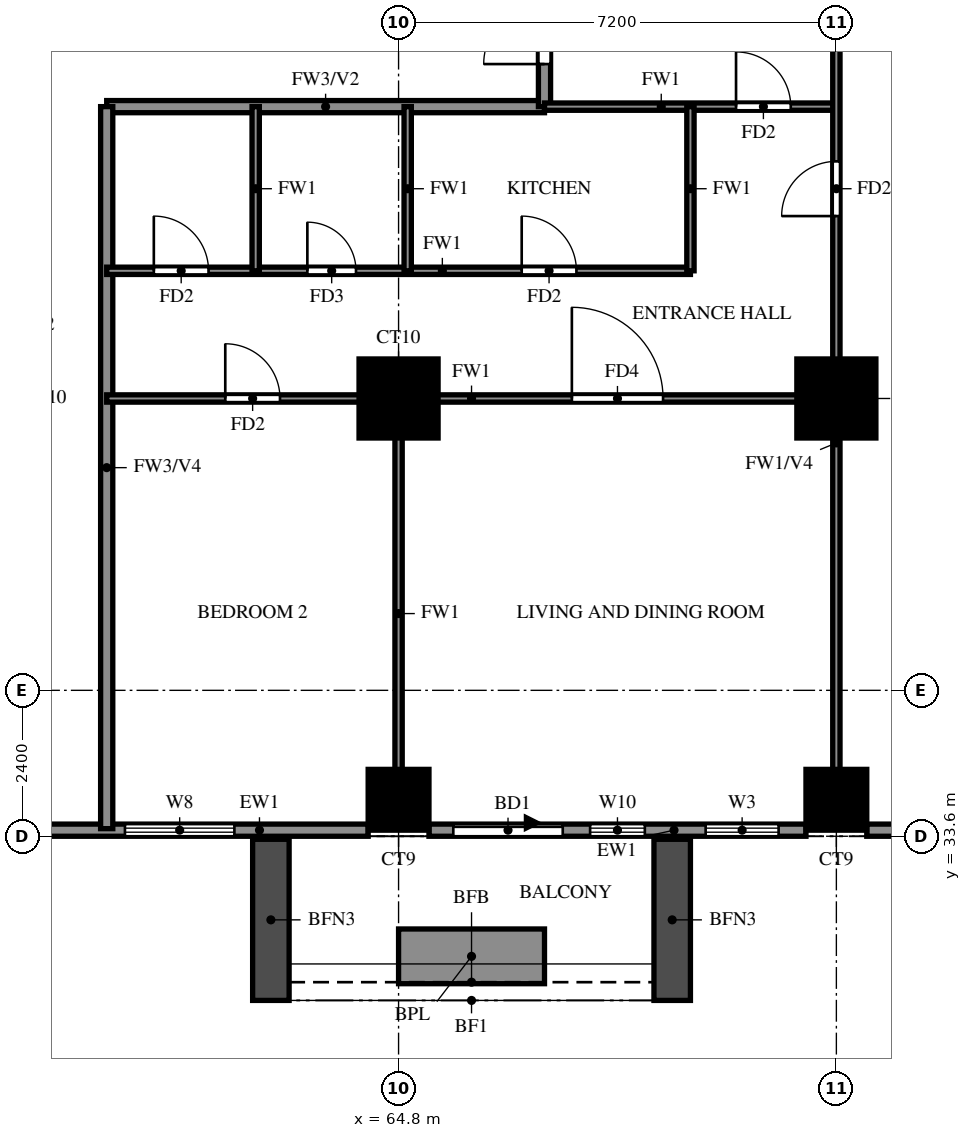
"""IFC4 building model, lengths in metres.
Left out: names, types, materials, properties, quantities, classifications, styles, units other than length and angle.
Written with IfcOpenShell. Run it as: python <this file> out.ifc"""

import sys

from ifc_helpers import new_model, si_unit, direction, frame, frame_2d, origin, origin_2d, place, context, subcontext, project, spatial, rectangle, extrude, source, transform, mapped, element, fill, save


model = new_model("IFC4")
c1 = context("Model", 3, precision=1e-05, world=origin(), true_north=direction((0.0, 1.0)))
c2 = subcontext(c1, "Body", "Model", "MODEL_VIEW")
j1 = project(units=[si_unit("LENGTHUNIT", "METRE"), si_unit("PLANEANGLEUNIT", "RADIAN")], contexts=[c1])
p1 = place(None, origin())
s1 = spatial("IfcSite", under=j1, at=p1, CompositionType="ELEMENT")
p2 = place(p1, origin())
s2 = spatial("IfcBuilding", under=s1, at=p2, CompositionType="ELEMENT")
p3 = place(p2, frame((0.0, 0.0, 62.0)))
s3 = spatial("IfcBuildingStorey", under=s2, at=p3, CompositionType="ELEMENT", Elevation=62.0)
m1 = source(origin(), c2, "Body", "SweptSolid", [
    extrude(rectangle(XDim=1.0, YDim=1.0, at=origin_2d()), origin(), (0.0, 0.0, 1.0), 3.18),
])
for number, where, z_axis, x_axis in (
    (1, (64.8, 34.2, 0.0), (0.0, 0.0, 1.0), (1.0, 0.0, 0.0)),
    (2, (72.0, 34.2, 0.0), (0.0, 0.0, 1.0), (1.0, 0.0, 0.0)),
):
    element("IfcColumn", number, at=place(p3, frame(where, z_axis=z_axis, x_axis=x_axis)), inside=s3, PredefinedType="COLUMN", context=c2, shape_type="MappedRepresentation", body=[
        mapped(m1, transform((0.0, 0.0, 0.0))),
    ])
m2 = source(origin(), c2, "Body", "SweptSolid", [
    extrude(rectangle(XDim=1.3, YDim=1.3, at=origin_2d()), origin(), (0.0, 0.0, 1.0), 3.18),
])
for number, where, z_axis, x_axis in (
    (3, (64.8, 40.8, 0.0), (0.0, 0.0, 1.0), (1.0, 0.0, 0.0)),
    (4, (72.0, 40.8, 0.0), (0.0, 0.0, 1.0), (1.0, 0.0, 0.0)),
):
    element("IfcColumn", number, at=place(p3, frame(where, z_axis=z_axis, x_axis=x_axis)), inside=s3, PredefinedType="COLUMN", context=c2, shape_type="MappedRepresentation", body=[
        mapped(m2, transform((0.0, 0.0, 0.0))),
    ])
p4 = place(p3, frame((85.996, 33.863, 0.0), z_axis=(0.0, 0.0, 1.0), x_axis=(-0.707100718496, 0.707112843825, 0.0)))
e5 = element("IfcWall", 5, at=p4, inside=s3, PredefinedType="SOLIDWALL", context=c2, shape_type="SweptSolid", body=[
    extrude(rectangle(XDim=20.135, YDim=0.2, at=frame_2d((10.067, 0.0))), origin(), (0.0, 0.0, 1.0), 3.18),
])
p5 = place(p3, frame((58.8, 33.7, 0.0), z_axis=(0.0, 0.0, 1.0), x_axis=(1.0, 0.0, 0.0)))
e6 = element("IfcWall", 6, at=p5, inside=s3, PredefinedType="SOLIDWALL", context=c2, shape_type="SweptSolid", body=[
    extrude(rectangle(XDim=5.5, YDim=0.2, at=frame_2d((2.75, 0.0))), origin(), (0.0, 0.0, 1.0), 3.18),
])
p6 = place(p5, frame((1.5, 0.0, 0.6)))
e7 = element("IfcOpeningElement", 7, at=p6, cuts=e6, PredefinedType="OPENING", context=c2, shape_type="SweptSolid", body=[
    extrude(rectangle(XDim=1.8, YDim=2.4, at=frame_2d((0.9, 1.2))), frame((0.0, 0.11, 0.0), z_axis=(0.0, -1.0, 0.0), x_axis=(1.0, 0.0, 0.0)), (0.0, 0.0, 1.0), 0.22),
])
p7 = place(p3, frame((65.3, 33.7, 0.0), z_axis=(0.0, 0.0, 1.0), x_axis=(1.0, 0.0, 0.0)))
e8 = element("IfcWall", 8, at=p7, inside=s3, PredefinedType="SOLIDWALL", context=c2, shape_type="SweptSolid", body=[
    extrude(rectangle(XDim=6.2, YDim=0.2, at=frame_2d((3.1, 0.0))), origin(), (0.0, 0.0, 1.0), 3.18),
])
p8 = place(p7, frame((0.4, 0.0, 0.0)))
e9 = element("IfcOpeningElement", 9, at=p8, cuts=e8, PredefinedType="OPENING", context=c2, shape_type="SweptSolid", body=[
    extrude(rectangle(XDim=1.8, YDim=2.4, at=frame_2d((0.9, 1.2))), frame((0.0, 0.11, 0.0), z_axis=(0.0, -1.0, 0.0), x_axis=(1.0, 0.0, 0.0)), (0.0, 0.0, 1.0), 0.22),
])
p9 = place(p7, frame((2.65, 0.0, 0.6)))
e10 = element("IfcOpeningElement", 10, at=p9, cuts=e8, PredefinedType="OPENING", context=c2, shape_type="SweptSolid", body=[
    extrude(rectangle(XDim=0.9, YDim=2.4, at=frame_2d((0.45, 1.2))), frame((0.0, 0.11, 0.0), z_axis=(0.0, -1.0, 0.0), x_axis=(1.0, 0.0, 0.0)), (0.0, 0.0, 1.0), 0.22),
])
p10 = place(p7, frame((4.55, 0.0, 0.6)))
e11 = element("IfcOpeningElement", 11, at=p10, cuts=e8, PredefinedType="OPENING", context=c2, shape_type="SweptSolid", body=[
    extrude(rectangle(XDim=1.2, YDim=2.4, at=frame_2d((0.6, 1.2))), frame((0.0, 0.11, 0.0), z_axis=(0.0, -1.0, 0.0), x_axis=(1.0, 0.0, 0.0)), (0.0, 0.0, 1.0), 0.22),
])
p11 = place(p3, frame((72.5, 33.7, 0.0), z_axis=(0.0, 0.0, 1.0), x_axis=(1.0, 0.0, 0.0)))
e12 = element("IfcWall", 12, at=p11, inside=s3, PredefinedType="SOLIDWALL", context=c2, shape_type="SweptSolid", body=[
    extrude(rectangle(XDim=10.9, YDim=0.2, at=frame_2d((5.45, 0.0))), origin(), (0.0, 0.0, 1.0), 3.18),
])
p12 = place(p11, frame((7.0, 0.0, 0.0)))
e13 = element("IfcOpeningElement", 13, at=p12, cuts=e12, PredefinedType="OPENING", context=c2, shape_type="SweptSolid", body=[
    extrude(rectangle(XDim=1.8, YDim=2.4, at=frame_2d((0.9, 1.2))), frame((0.0, 0.11, 0.0), z_axis=(0.0, -1.0, 0.0), x_axis=(1.0, 0.0, 0.0)), (0.0, 0.0, 1.0), 0.22),
])
p13 = place(p11, frame((1.05, 0.0, 0.6)))
e14 = element("IfcOpeningElement", 14, at=p13, cuts=e12, PredefinedType="OPENING", context=c2, shape_type="SweptSolid", body=[
    extrude(rectangle(XDim=2.4, YDim=2.4, at=frame_2d((1.2, 1.2))), frame((0.0, 0.11, 0.0), z_axis=(0.0, -1.0, 0.0), x_axis=(1.0, 0.0, 0.0)), (0.0, 0.0, 1.0), 0.22),
])
p14 = place(p11, frame((5.2, 0.0, 0.6)))
e15 = element("IfcOpeningElement", 15, at=p14, cuts=e12, PredefinedType="OPENING", context=c2, shape_type="SweptSolid", body=[
    extrude(rectangle(XDim=1.2, YDim=2.4, at=frame_2d((0.6, 1.2))), frame((0.0, 0.11, 0.0), z_axis=(0.0, -1.0, 0.0), x_axis=(1.0, 0.0, 0.0)), (0.0, 0.0, 1.0), 0.22),
])
p15 = place(p11, frame((9.3, 0.0, 0.6)))
e16 = element("IfcOpeningElement", 16, at=p15, cuts=e12, PredefinedType="OPENING", context=c2, shape_type="SweptSolid", body=[
    extrude(rectangle(XDim=1.2, YDim=2.4, at=frame_2d((0.6, 1.2))), frame((0.0, 0.11, 0.0), z_axis=(0.0, -1.0, 0.0), x_axis=(1.0, 0.0, 0.0)), (0.0, 0.0, 1.0), 0.22),
])
for number, where, z_axis, x_axis in (
    (17, (62.7, 33.55, 0.0), (0.0, 0.0, 1.0), (0.0, -1.0, 0.0)),
    (18, (69.3, 33.55, 0.0), (0.0, 0.0, 1.0), (0.0, -1.0, 0.0)),
):
    element("IfcWall", number, at=place(p3, frame(where, z_axis=z_axis, x_axis=x_axis)), inside=s3, PredefinedType="SOLIDWALL", context=c2, shape_type="SweptSolid", body=[
        extrude(rectangle(XDim=2.65, YDim=0.6, at=frame_2d((1.325, 0.0))), origin(), (0.0, 0.0, 1.0), 2.85),
    ])
p16 = place(p3, frame((64.8, 31.625, 0.0), z_axis=(0.0, 0.0, 1.0), x_axis=(1.0, 0.0, 0.0)))
e19 = element("IfcWall", 19, at=p16, inside=s3, PredefinedType="SOLIDWALL", context=c2, shape_type="SweptSolid", body=[
    extrude(rectangle(XDim=2.4, YDim=0.9, at=frame_2d((1.2, 0.0))), origin(), (0.0, 0.0, 1.0), 0.9),
])
p17 = place(p3, frame((60.0, 45.6, 0.0), z_axis=(0.0, 0.0, 1.0), x_axis=(1.0, 0.0, 0.0)))
e20 = element("IfcWall", 20, at=p17, inside=s3, PredefinedType="SOLIDWALL", context=c2, shape_type="SweptSolid", body=[
    extrude(rectangle(XDim=7.2, YDim=0.2, at=frame_2d((3.6, 0.0))), origin(), (0.0, 0.0, 1.0), 3.18),
])
p18 = place(p3, frame((60.0, 33.725, 0.0), z_axis=(0.0, 0.0, 1.0), x_axis=(0.0, 1.0, 0.0)))
e21 = element("IfcWall", 21, at=p18, inside=s3, PredefinedType="SOLIDWALL", context=c2, shape_type="SweptSolid", body=[
    extrude(rectangle(XDim=11.875, YDim=0.2, at=frame_2d((5.938, 0.0))), origin(), (0.0, 0.0, 1.0), 2.28),
])
p19 = place(p3, frame((67.2, 45.6, 0.0), z_axis=(0.0, 0.0, 1.0), x_axis=(0.0, 1.0, 0.0)))
e22 = element("IfcWall", 22, at=p19, inside=s3, PredefinedType="SOLIDWALL", context=c2, shape_type="SweptSolid", body=[
    extrude(rectangle(XDim=12.0, YDim=0.2, at=frame_2d((6.0, 0.0))), origin(), (0.0, 0.0, 1.0), 3.18),
])
p20 = place(p19, frame((10.3, 0.0, 0.0)))
e23 = element("IfcOpeningElement", 23, at=p20, cuts=e22, PredefinedType="OPENING", context=c2, shape_type="SweptSolid", body=[
    extrude(rectangle(XDim=1.0, YDim=2.1, at=frame_2d((0.5, 1.05))), frame((0.0, 0.11, 0.0), z_axis=(0.0, -1.0, 0.0), x_axis=(1.0, 0.0, 0.0)), (0.0, 0.0, 1.0), 0.22),
])
p21 = place(p19, frame((0.7, 0.0, 0.0)))
e24 = element("IfcOpeningElement", 24, at=p21, cuts=e22, PredefinedType="OPENING", context=c2, shape_type="SweptSolid", body=[
    extrude(rectangle(XDim=1.0, YDim=2.1, at=frame_2d((0.5, 1.05))), frame((0.0, 0.11, 0.0), z_axis=(0.0, -1.0, 0.0), x_axis=(1.0, 0.0, 0.0)), (0.0, 0.0, 1.0), 0.22),
])
p22 = place(p3, frame((60.0, 40.8, 0.0), z_axis=(0.0, 0.0, 1.0), x_axis=(1.0, 0.0, 0.0)))
e25 = element("IfcWall", 25, at=p22, inside=s3, PredefinedType="PARTITIONING", context=c2, shape_type="SweptSolid", body=[
    extrude(rectangle(XDim=12.0, YDim=0.12, at=frame_2d((6.0, 0.0))), origin(), (0.0, 0.0, 1.0), 3.18),
])
p23 = place(p22, frame((7.65, 0.0, 0.0)))
e26 = element("IfcOpeningElement", 26, at=p23, cuts=e25, PredefinedType="OPENING", context=c2, shape_type="SweptSolid", body=[
    extrude(rectangle(XDim=1.5, YDim=2.1, at=frame_2d((0.75, 1.05))), frame((0.0, 0.07, 0.0), z_axis=(0.0, -1.0, 0.0), x_axis=(1.0, 0.0, 0.0)), (0.0, 0.0, 1.0), 0.14),
])
p24 = place(p22, frame((1.95, 0.0, 0.0)))
e27 = element("IfcOpeningElement", 27, at=p24, cuts=e25, PredefinedType="OPENING", context=c2, shape_type="SweptSolid", body=[
    extrude(rectangle(XDim=0.9, YDim=2.1, at=frame_2d((0.45, 1.05))), frame((0.0, 0.07, 0.0), z_axis=(0.0, -1.0, 0.0), x_axis=(1.0, 0.0, 0.0)), (0.0, 0.0, 1.0), 0.14),
])
p25 = place(p3, frame((60.0, 42.9, 0.0), z_axis=(0.0, 0.0, 1.0), x_axis=(1.0, 0.0, 0.0)))
e28 = element("IfcWall", 28, at=p25, inside=s3, PredefinedType="PARTITIONING", context=c2, shape_type="SweptSolid", body=[
    extrude(rectangle(XDim=9.6, YDim=0.12, at=frame_2d((4.8, 0.0))), origin(), (0.0, 0.0, 1.0), 3.18),
])
p26 = place(p25, frame((6.825, 0.0, 0.0)))
e29 = element("IfcOpeningElement", 29, at=p26, cuts=e28, PredefinedType="OPENING", context=c2, shape_type="SweptSolid", body=[
    extrude(rectangle(XDim=0.9, YDim=2.1, at=frame_2d((0.45, 1.05))), frame((0.0, 0.07, 0.0), z_axis=(0.0, -1.0, 0.0), x_axis=(1.0, 0.0, 0.0)), (0.0, 0.0, 1.0), 0.14),
])
p27 = place(p25, frame((3.3, 0.0, 0.0)))
e30 = element("IfcOpeningElement", 30, at=p27, cuts=e28, PredefinedType="OPENING", context=c2, shape_type="SweptSolid", body=[
    extrude(rectangle(XDim=0.8, YDim=2.1, at=frame_2d((0.4, 1.05))), frame((0.0, 0.07, 0.0), z_axis=(0.0, -1.0, 0.0), x_axis=(1.0, 0.0, 0.0)), (0.0, 0.0, 1.0), 0.14),
])
p28 = place(p25, frame((0.775, 0.0, 0.0)))
e31 = element("IfcOpeningElement", 31, at=p28, cuts=e28, PredefinedType="OPENING", context=c2, shape_type="SweptSolid", body=[
    extrude(rectangle(XDim=0.9, YDim=2.1, at=frame_2d((0.45, 1.05))), frame((0.0, 0.07, 0.0), z_axis=(0.0, -1.0, 0.0), x_axis=(1.0, 0.0, 0.0)), (0.0, 0.0, 1.0), 0.14),
])
p29 = place(p3, frame((67.2, 45.6, 0.0), z_axis=(0.0, 0.0, 1.0), x_axis=(1.0, 0.0, 0.0)))
e32 = element("IfcWall", 32, at=p29, inside=s3, PredefinedType="PARTITIONING", context=c2, shape_type="SweptSolid", body=[
    extrude(rectangle(XDim=4.8, YDim=0.12, at=frame_2d((2.4, 0.0))), origin(), (0.0, 0.0, 1.0), 3.18),
])
p30 = place(p29, frame((3.15, 0.0, 0.0)))
e33 = element("IfcOpeningElement", 33, at=p30, cuts=e32, PredefinedType="OPENING", context=c2, shape_type="SweptSolid", body=[
    extrude(rectangle(XDim=0.9, YDim=2.1, at=frame_2d((0.45, 1.05))), frame((0.0, 0.07, 0.0), z_axis=(0.0, -1.0, 0.0), x_axis=(1.0, 0.0, 0.0)), (0.0, 0.0, 1.0), 0.14),
])
p31 = place(p3, frame((62.45, 42.9, 0.0), z_axis=(0.0, 0.0, 1.0), x_axis=(0.0, 1.0, 0.0)))
e34 = element("IfcWall", 34, at=p31, inside=s3, PredefinedType="PARTITIONING", context=c2, shape_type="SweptSolid", body=[
    extrude(rectangle(XDim=2.7, YDim=0.12, at=frame_2d((1.35, 0.0))), origin(), (0.0, 0.0, 1.0), 3.18),
])
p32 = place(p3, frame((64.8, 33.725, 0.0), z_axis=(0.0, 0.0, 1.0), x_axis=(0.0, 1.0, 0.0)))
e35 = element("IfcWall", 35, at=p32, inside=s3, PredefinedType="PARTITIONING", context=c2, shape_type="SweptSolid", body=[
    extrude(rectangle(XDim=7.075, YDim=0.12, at=frame_2d((3.538, 0.0))), origin(), (0.0, 0.0, 1.0), 3.18),
])
for number, where, z_axis, x_axis in (
    (36, (64.95, 42.9, 0.0), (0.0, 0.0, 1.0), (0.0, 1.0, 0.0)),
    (37, (69.6, 42.9, 0.0), (0.0, 0.0, 1.0), (0.0, 1.0, 0.0)),
):
    element("IfcWall", number, at=place(p3, frame(where, z_axis=z_axis, x_axis=x_axis)), inside=s3, PredefinedType="PARTITIONING", context=c2, shape_type="SweptSolid", body=[
        extrude(rectangle(XDim=2.7, YDim=0.12, at=frame_2d((1.35, 0.0))), origin(), (0.0, 0.0, 1.0), 3.18),
    ])
p33 = place(p3, frame((72.0, 33.725, 0.0), z_axis=(0.0, 0.0, 1.0), x_axis=(0.0, 1.0, 0.0)))
e38 = element("IfcWall", 38, at=p33, inside=s3, PredefinedType="PARTITIONING", context=c2, shape_type="SweptSolid", body=[
    extrude(rectangle(XDim=14.098, YDim=0.12, at=frame_2d((7.049, 0.0))), origin(), (0.0, 0.0, 1.0), 2.28),
])
p34 = place(p33, frame((10.075, 0.0, 0.0)))
e39 = element("IfcOpeningElement", 39, at=p34, cuts=e38, PredefinedType="OPENING", context=c2, shape_type="SweptSolid", body=[
    extrude(rectangle(XDim=0.9, YDim=2.1, at=frame_2d((0.45, 1.05))), frame((0.0, 0.07, 0.0), z_axis=(0.0, -1.0, 0.0), x_axis=(1.0, 0.0, 0.0)), (0.0, 0.0, 1.0), 0.14),
])
p35 = place(p6, origin())
e40 = element("IfcWindow", 40, at=p35, inside=s3, PartitioningType="DOUBLE_PANEL_VERTICAL", PredefinedType="WINDOW", context=c2, shape_type="SweptSolid", body=[
    extrude(rectangle(XDim=1.8, YDim=2.4, at=frame_2d((0.9, 1.2))), frame((0.0, 0.03, 0.0), z_axis=(0.0, -1.0, 0.0), x_axis=(1.0, 0.0, 0.0)), (0.0, 0.0, 1.0), 0.06),
])
fill(e7, e40)
p36 = place(p8, origin())
e41 = element("IfcDoor", 41, at=p36, inside=s3, OperationType="DOUBLE_DOOR_SLIDING", PredefinedType="DOOR", context=c2, shape_type="SweptSolid", body=[
    extrude(rectangle(XDim=1.8, YDim=2.4, at=frame_2d((0.9, 1.2))), frame((0.0, 0.025, 0.0), z_axis=(0.0, -1.0, 0.0), x_axis=(1.0, 0.0, 0.0)), (0.0, 0.0, 1.0), 0.05),
])
fill(e9, e41)
p37 = place(p9, origin())
e42 = element("IfcWindow", 42, at=p37, inside=s3, PartitioningType="SINGLE_PANEL", PredefinedType="WINDOW", context=c2, shape_type="SweptSolid", body=[
    extrude(rectangle(XDim=0.9, YDim=2.4, at=frame_2d((0.45, 1.2))), frame((0.0, 0.03, 0.0), z_axis=(0.0, -1.0, 0.0), x_axis=(1.0, 0.0, 0.0)), (0.0, 0.0, 1.0), 0.06),
])
fill(e10, e42)
p38 = place(p10, origin())
e43 = element("IfcWindow", 43, at=p38, inside=s3, PartitioningType="SINGLE_PANEL", PredefinedType="WINDOW", context=c2, shape_type="SweptSolid", body=[
    extrude(rectangle(XDim=1.2, YDim=2.4, at=frame_2d((0.6, 1.2))), frame((0.0, 0.03, 0.0), z_axis=(0.0, -1.0, 0.0), x_axis=(1.0, 0.0, 0.0)), (0.0, 0.0, 1.0), 0.06),
])
fill(e11, e43)
p39 = place(p30, origin())
e44 = element("IfcDoor", 44, at=p39, inside=s3, OperationType="SINGLE_SWING_LEFT", PredefinedType="DOOR", context=c2, shape_type="SweptSolid", body=[
    extrude(rectangle(XDim=0.9, YDim=2.1, at=frame_2d((0.45, 1.05))), frame((0.0, 0.025, 0.0), z_axis=(0.0, -1.0, 0.0), x_axis=(1.0, 0.0, 0.0)), (0.0, 0.0, 1.0), 0.05),
])
fill(e33, e44)
p40 = place(p21, origin())
e45 = element("IfcDoor", 45, at=p40, inside=s3, OperationType="SINGLE_SWING_LEFT", PredefinedType="DOOR", context=c2, shape_type="SweptSolid", body=[
    extrude(rectangle(XDim=1.0, YDim=2.1, at=frame_2d((0.5, 1.05))), frame((0.0, 0.025, 0.0), z_axis=(0.0, -1.0, 0.0), x_axis=(1.0, 0.0, 0.0)), (0.0, 0.0, 1.0), 0.05),
])
fill(e24, e45)
p41 = place(p23, origin())
e46 = element("IfcDoor", 46, at=p41, inside=s3, OperationType="SINGLE_SWING_RIGHT", PredefinedType="DOOR", context=c2, shape_type="SweptSolid", body=[
    extrude(rectangle(XDim=1.5, YDim=2.1, at=frame_2d((0.75, 1.05))), frame((0.0, 0.025, 0.0), z_axis=(0.0, -1.0, 0.0), x_axis=(1.0, 0.0, 0.0)), (0.0, 0.0, 1.0), 0.05),
])
fill(e26, e46)
p42 = place(p24, origin())
e47 = element("IfcDoor", 47, at=p42, inside=s3, OperationType="SINGLE_SWING_LEFT", PredefinedType="DOOR", context=c2, shape_type="SweptSolid", body=[
    extrude(rectangle(XDim=0.9, YDim=2.1, at=frame_2d((0.45, 1.05))), frame((0.0, 0.025, 0.0), z_axis=(0.0, -1.0, 0.0), x_axis=(1.0, 0.0, 0.0)), (0.0, 0.0, 1.0), 0.05),
])
fill(e27, e47)
p43 = place(p26, origin())
e48 = element("IfcDoor", 48, at=p43, inside=s3, OperationType="SINGLE_SWING_LEFT", PredefinedType="DOOR", context=c2, shape_type="SweptSolid", body=[
    extrude(rectangle(XDim=0.9, YDim=2.1, at=frame_2d((0.45, 1.05))), frame((0.0, 0.025, 0.0), z_axis=(0.0, -1.0, 0.0), x_axis=(1.0, 0.0, 0.0)), (0.0, 0.0, 1.0), 0.05),
])
fill(e29, e48)
p44 = place(p27, origin())
e49 = element("IfcDoor", 49, at=p44, inside=s3, OperationType="SINGLE_SWING_RIGHT", PredefinedType="DOOR", context=c2, shape_type="SweptSolid", body=[
    extrude(rectangle(XDim=0.8, YDim=2.1, at=frame_2d((0.4, 1.05))), frame((0.0, 0.025, 0.0), z_axis=(0.0, -1.0, 0.0), x_axis=(1.0, 0.0, 0.0)), (0.0, 0.0, 1.0), 0.05),
])
fill(e30, e49)
p45 = place(p28, origin())
e50 = element("IfcDoor", 50, at=p45, inside=s3, OperationType="SINGLE_SWING_LEFT", PredefinedType="DOOR", context=c2, shape_type="SweptSolid", body=[
    extrude(rectangle(XDim=0.9, YDim=2.1, at=frame_2d((0.45, 1.05))), frame((0.0, 0.025, 0.0), z_axis=(0.0, -1.0, 0.0), x_axis=(1.0, 0.0, 0.0)), (0.0, 0.0, 1.0), 0.05),
])
fill(e31, e50)
p46 = place(p34, origin())
e51 = element("IfcDoor", 51, at=p46, inside=s3, OperationType="SINGLE_SWING_LEFT", PredefinedType="DOOR", context=c2, shape_type="SweptSolid", body=[
    extrude(rectangle(XDim=0.9, YDim=2.1, at=frame_2d((0.45, 1.05))), frame((0.0, 0.025, 0.0), z_axis=(0.0, -1.0, 0.0), x_axis=(1.0, 0.0, 0.0)), (0.0, 0.0, 1.0), 0.05),
])
fill(e39, e51)
save(model, sys.argv[1])
